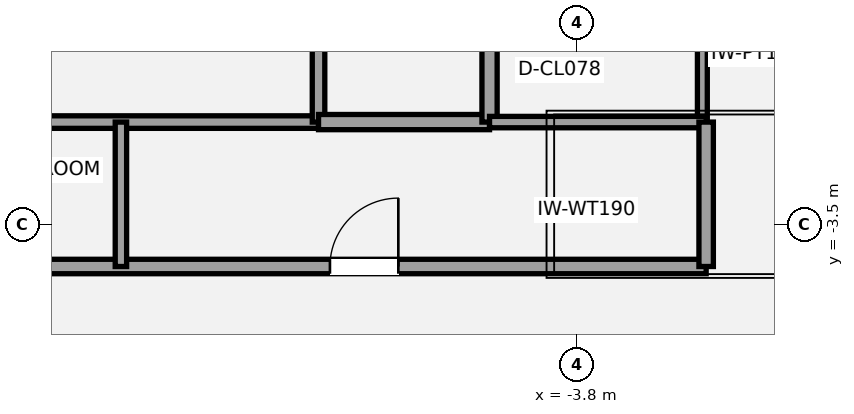
"""IFC4 building model, lengths in metres.
Left out: names, types, materials, properties, quantities, classifications, styles, units other than length and angle.
Written with IfcOpenShell. Run it as: python <this file> out.ifc"""

import sys

from ifc_helpers import new_model, si_unit, direction, frame, frame_2d, origin, place, context, subcontext, project, spatial, rectangle, extrude, element, fill, save


model = new_model("IFC4")
c1 = context("Model", 3, precision=1e-05, world=origin(), true_north=direction((0.0, 1.0)))
c2 = subcontext(c1, "Body", "Model", "MODEL_VIEW")
j1 = project(units=[si_unit("LENGTHUNIT", "METRE"), si_unit("PLANEANGLEUNIT", "RADIAN")], contexts=[c1])
p1 = place(None, origin())
s1 = spatial("IfcSite", under=j1, at=p1, CompositionType="ELEMENT")
p2 = place(p1, origin())
s2 = spatial("IfcBuilding", under=s1, at=p2, CompositionType="ELEMENT")
p3 = place(p2, frame((0.0, 0.0, 100.1)))
s3 = spatial("IfcBuildingStorey", under=s2, at=p3, CompositionType="ELEMENT", Elevation=100.1)
p4 = place(p3, frame((-13.45, -2.15, 0.0), z_axis=(0.0, 0.0, 1.0), x_axis=(1.0, 0.0, 0.0)))
e1 = element("IfcWall", 1, at=p4, inside=s3, PredefinedType="PARTITIONING", context=c2, shape_type="SweptSolid", body=[
    extrude(rectangle(XDim=6.25, YDim=0.165, at=frame_2d((3.125, 0.0))), origin(), (0.0, 0.0, 1.0), 2.763),
])
p5 = place(p3, frame((-7.2, -2.15, 0.0), z_axis=(0.0, 0.0, 1.0), x_axis=(0.0, 1.0, 0.0)))
e2 = element("IfcWall", 2, at=p5, inside=s3, PredefinedType="PARTITIONING", context=c2, shape_type="SweptSolid", body=[
    extrude(rectangle(XDim=3.3, YDim=0.165, at=frame_2d((1.65, 0.0))), origin(), (0.0, 0.0, 1.0), 2.763),
])
p6 = place(p3, frame((-7.2, -2.15, 0.0), z_axis=(0.0, 0.0, 1.0), x_axis=(1.0, 0.0, 0.0)))
e3 = element("IfcWall", 3, at=p6, inside=s3, PredefinedType="SOLIDWALL", context=c2, shape_type="SweptSolid", body=[
    extrude(rectangle(XDim=2.25, YDim=0.2, at=frame_2d((1.125, 0.0))), origin(), (0.0, 0.0, 1.0), 2.763),
])
p7 = place(p3, frame((-4.95, -2.15, 0.0), z_axis=(0.0, 0.0, 1.0), x_axis=(0.0, 1.0, 0.0)))
e4 = element("IfcWall", 4, at=p7, inside=s3, PredefinedType="SOLIDWALL", context=c2, shape_type="SweptSolid", body=[
    extrude(rectangle(XDim=3.3, YDim=0.2, at=frame_2d((1.65, 0.0))), origin(), (0.0, 0.0, 1.0), 2.763),
])
p8 = place(p7, frame((0.95, 0.0, 0.0)))
e5 = element("IfcOpeningElement", 5, at=p8, cuts=e4, PredefinedType="OPENING", context=c2, shape_type="SweptSolid", body=[
    extrude(rectangle(XDim=0.75, YDim=2.1, at=frame_2d((0.375, 1.05))), frame((0.0, 0.11, 0.0), z_axis=(0.0, -1.0, 0.0), x_axis=(1.0, 0.0, 0.0)), (0.0, 0.0, 1.0), 0.22),
])
p9 = place(p3, frame((-2.15, -2.15, 0.0), z_axis=(0.0, 0.0, 1.0), x_axis=(0.0, 1.0, 0.0)))
e6 = element("IfcWall", 6, at=p9, inside=s3, PredefinedType="PARTITIONING", context=c2, shape_type="SweptSolid", body=[
    extrude(rectangle(XDim=1.8, YDim=0.13, at=frame_2d((0.9, 0.0))), origin(), (0.0, 0.0, 1.0), 3.31),
])
p10 = place(p3, frame((-13.45, -4.05, 0.0), z_axis=(0.0, 0.0, 1.0), x_axis=(1.0, 0.0, 0.0)))
e7 = element("IfcWall", 7, at=p10, inside=s3, PredefinedType="PLUMBINGWALL", context=c2, shape_type="SweptSolid", body=[
    extrude(rectangle(XDim=11.35, YDim=0.19, at=frame_2d((5.675, 0.0))), origin(), (0.0, 0.0, 1.0), 2.763),
])
p11 = place(p10, frame((1.25, 0.0, 0.0)))
e8 = element("IfcOpeningElement", 8, at=p11, cuts=e7, PredefinedType="OPENING", context=c2, shape_type="SweptSolid", body=[
    extrude(rectangle(XDim=0.95, YDim=2.15, at=frame_2d((0.475, 1.075))), frame((0.0, 0.105, 0.0), z_axis=(0.0, -1.0, 0.0), x_axis=(1.0, 0.0, 0.0)), (0.0, 0.0, 1.0), 0.21),
])
p12 = place(p10, frame((6.4, 0.0, 0.0)))
e9 = element("IfcOpeningElement", 9, at=p12, cuts=e7, PredefinedType="OPENING", context=c2, shape_type="SweptSolid", body=[
    extrude(rectangle(XDim=0.9, YDim=2.1, at=frame_2d((0.45, 1.05))), frame((0.0, 0.105, 0.0), z_axis=(0.0, -1.0, 0.0), x_axis=(1.0, 0.0, 0.0)), (0.0, 0.0, 1.0), 0.21),
])
p13 = place(p3, frame((-4.95, -2.15, 0.0), z_axis=(0.0, 0.0, 1.0), x_axis=(1.0, 0.0, 0.0)))
e10 = element("IfcWall", 10, at=p13, inside=s3, PredefinedType="PLUMBINGWALL", context=c2, shape_type="SweptSolid", body=[
    extrude(rectangle(XDim=2.85, YDim=0.15, at=frame_2d((1.425, 0.0))), origin(), (0.0, 0.0, 1.0), 2.763),
])
p14 = place(p3, frame((-2.1, -4.05, 0.0), z_axis=(0.0, 0.0, 1.0), x_axis=(0.0, 1.0, 0.0)))
e11 = element("IfcWall", 11, at=p14, inside=s3, PredefinedType="PLUMBINGWALL", context=c2, shape_type="SweptSolid", body=[
    extrude(rectangle(XDim=1.9, YDim=0.19, at=frame_2d((0.95, 0.0))), origin(), (0.0, 0.0, 1.0), 3.31),
])
p15 = place(p3, frame((-9.8, -4.05, 0.0), z_axis=(0.0, 0.0, 1.0), x_axis=(0.0, 1.0, 0.0)))
e12 = element("IfcWall", 12, at=p15, inside=s3, PredefinedType="PLUMBINGWALL", context=c2, shape_type="SweptSolid", body=[
    extrude(rectangle(XDim=1.9, YDim=0.15, at=frame_2d((0.95, 0.0))), origin(), (0.0, 0.0, 1.0), 3.31),
])
p16 = place(p12, origin())
e13 = element("IfcDoor", 13, at=p16, inside=s3, OperationType="SINGLE_SWING_RIGHT", PredefinedType="DOOR", context=c2, shape_type="SweptSolid", body=[
    extrude(rectangle(XDim=0.9, YDim=2.1, at=frame_2d((0.45, 1.05))), frame((0.0, 0.025, 0.0), z_axis=(0.0, -1.0, 0.0), x_axis=(1.0, 0.0, 0.0)), (0.0, 0.0, 1.0), 0.05),
])
fill(e9, e13)
save(model, sys.argv[1])
